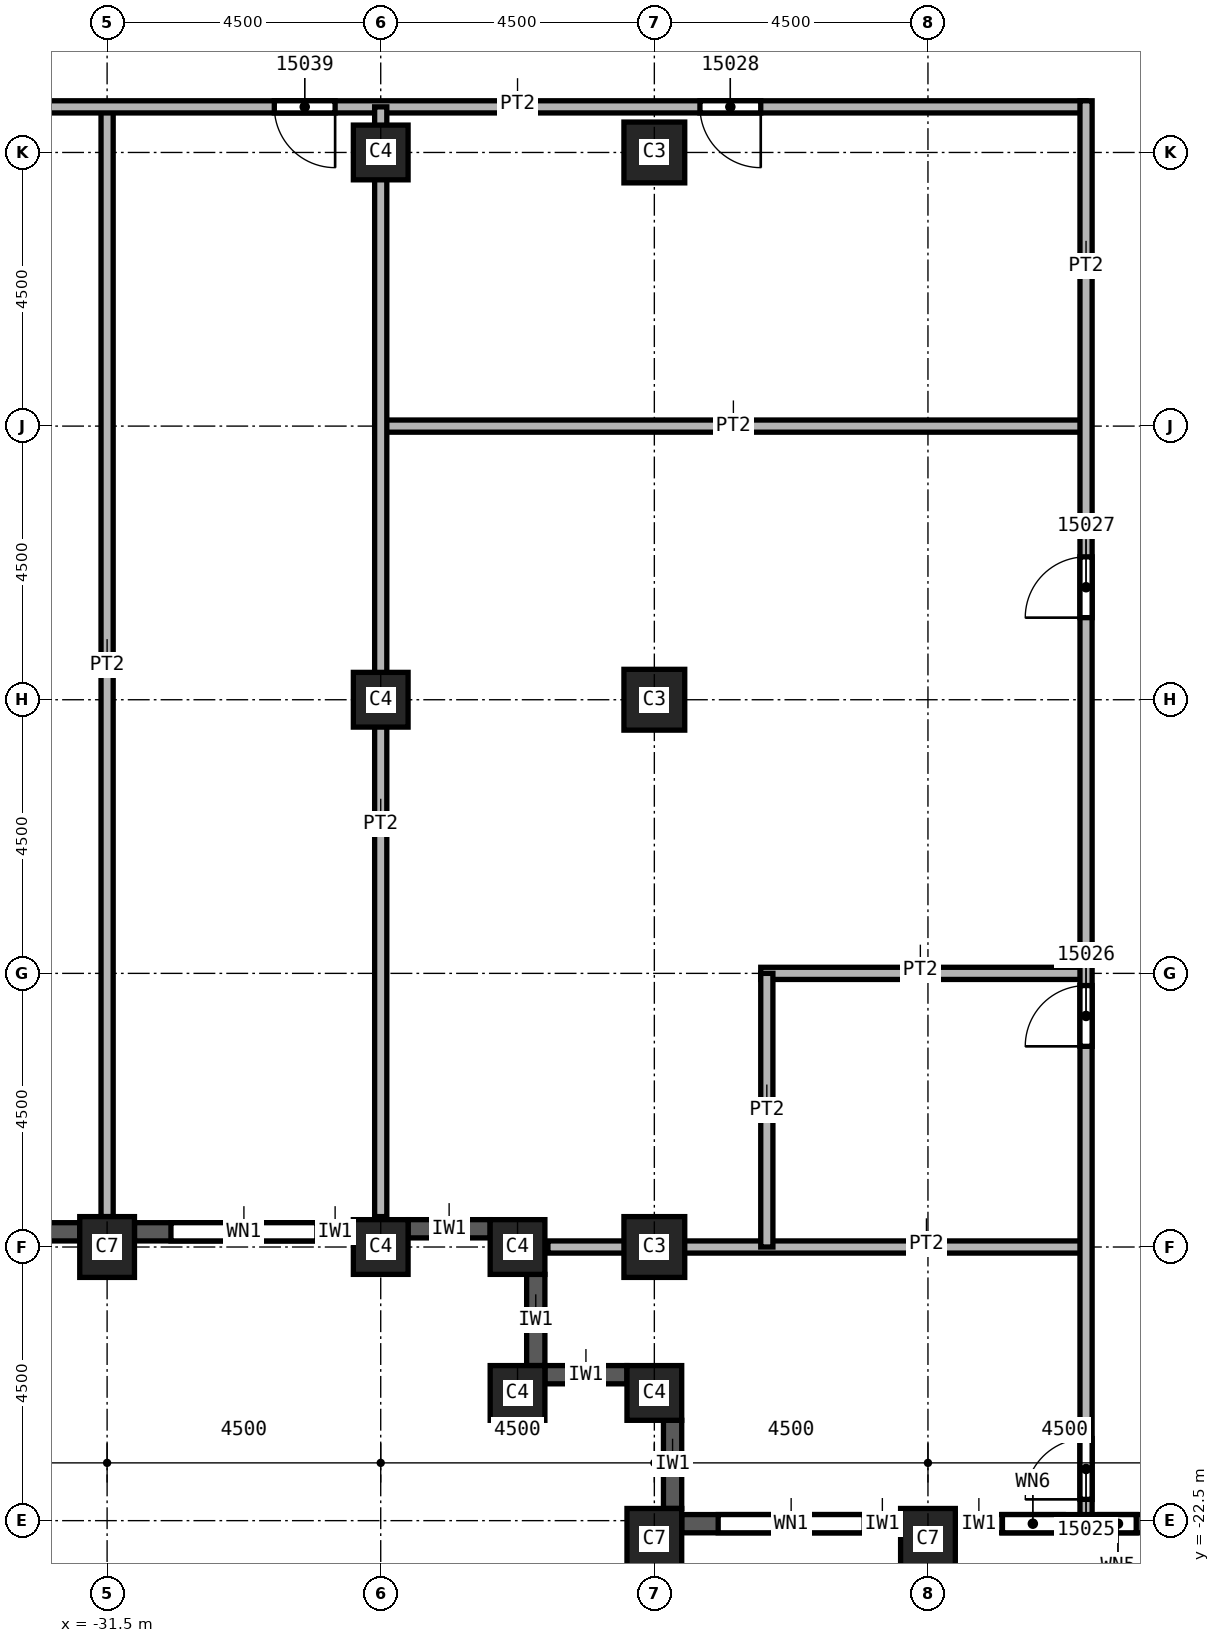
"""IFC4 building model, lengths in metres.
Left out: names, types, materials, properties, quantities, classifications, styles, units other than length and angle.
Written with IfcOpenShell. Run it as: python <this file> out.ifc"""

import sys

from ifc_helpers import new_model, si_unit, direction, frame, frame_2d, origin, origin_2d, place, context, subcontext, project, spatial, rectangle, extrude, element, fill, save


model = new_model("IFC4")
c1 = context("Model", 3, precision=1e-05, world=origin(), true_north=direction((0.0, 1.0)))
c2 = subcontext(c1, "Body", "Model", "MODEL_VIEW")
j1 = project(units=[si_unit("LENGTHUNIT", "METRE"), si_unit("PLANEANGLEUNIT", "RADIAN")], contexts=[c1])
p1 = place(None, origin())
s1 = spatial("IfcSite", under=j1, at=p1, CompositionType="ELEMENT")
p2 = place(p1, origin())
s2 = spatial("IfcBuilding", under=s1, at=p2, CompositionType="ELEMENT")
p3 = place(p2, frame((0.0, 0.0, 228.0)))
s3 = spatial("IfcBuildingStorey", under=s2, at=p3, CompositionType="ELEMENT", Elevation=228.0)
p4 = place(p3, frame((-31.5, -18.0, 0.0), z_axis=(0.0, 0.0, 1.0), x_axis=(1.0, 0.0, 0.0)))
e1 = element("IfcColumn", 1, at=p4, inside=s3, PredefinedType="COLUMN", context=c2, shape_type="SweptSolid", body=[
    extrude(rectangle(XDim=0.9, YDim=1.0, at=origin_2d()), origin(), (0.0, 0.0, 1.0), 3.72),
])
for number, where, z_axis, x_axis in (
    (2, (-22.5, 0.0, 0.0), (0.0, 0.0, 1.0), (1.0, 0.0, 0.0)),
    (3, (-22.5, -9.0, 0.0), (0.0, 0.0, 1.0), (1.0, 0.0, 0.0)),
    (4, (-22.5, -18.0, 0.0), (0.0, 0.0, 1.0), (1.0, 0.0, 0.0)),
):
    element("IfcColumn", number, at=place(p3, frame(where, z_axis=z_axis, x_axis=x_axis)), inside=s3, PredefinedType="COLUMN", context=c2, shape_type="SweptSolid", body=[
        extrude(rectangle(XDim=1.0, YDim=1.0, at=origin_2d()), origin(), (0.0, 0.0, 1.0), 3.72),
    ])
for number, where, z_axis, x_axis in (
    (5, (-18.0, -22.8, 0.0), (0.0, 0.0, 1.0), (1.0, 0.0, 0.0)),
    (6, (-22.5, -22.8, 0.0), (0.0, 0.0, 1.0), (1.0, 0.0, 0.0)),
):
    element("IfcColumn", number, at=place(p3, frame(where, z_axis=z_axis, x_axis=x_axis)), inside=s3, PredefinedType="COLUMN", context=c2, shape_type="SweptSolid", body=[
        extrude(rectangle(XDim=0.9, YDim=1.0, at=origin_2d()), origin(), (0.0, 0.0, 1.0), 3.72),
    ])
for number, where, z_axis, x_axis in (
    (7, (-27.0, 0.0, 0.0), (0.0, 0.0, 1.0), (1.0, 0.0, 0.0)),
    (8, (-27.0, -9.0, 0.0), (0.0, 0.0, 1.0), (1.0, 0.0, 0.0)),
    (9, (-27.0, -18.0, 0.0), (0.0, 0.0, 1.0), (1.0, 0.0, 0.0)),
    (10, (-22.5, -20.4, 0.0), (0.0, 0.0, 1.0), (1.0, 0.0, 0.0)),
    (11, (-24.75, -20.4, 0.0), (0.0, 0.0, 1.0), (1.0, 0.0, 0.0)),
    (12, (-24.75, -18.0, 0.0), (0.0, 0.0, 1.0), (1.0, 0.0, 0.0)),
):
    element("IfcColumn", number, at=place(p3, frame(where, z_axis=z_axis, x_axis=x_axis)), inside=s3, PredefinedType="COLUMN", context=c2, shape_type="SweptSolid", body=[
        extrude(rectangle(XDim=0.9, YDim=0.9, at=origin_2d()), origin(), (0.0, 0.0, 1.0), 3.72),
    ])
p5 = place(p3, frame((-35.55, -17.75, 0.0), z_axis=(0.0, 0.0, 1.0), x_axis=(1.0, 0.0, 0.0)))
e13 = element("IfcWall", 13, at=p5, inside=s3, PredefinedType="SOLIDWALL", context=c2, shape_type="SweptSolid", body=[
    extrude(rectangle(XDim=3.6, YDim=0.3, at=frame_2d((1.8, 0.0))), origin(), (0.0, 0.0, 1.0), 3.12),
])
p6 = place(p5, frame((0.6, 0.0, 0.8)))
e14 = element("IfcOpeningElement", 14, at=p6, cuts=e13, PredefinedType="OPENING", context=c2, shape_type="SweptSolid", body=[
    extrude(rectangle(XDim=2.4, YDim=1.95, at=frame_2d((1.2, 0.975))), frame((0.0, 0.15, 0.0), z_axis=(0.0, -1.0, 0.0), x_axis=(1.0, 0.0, 0.0)), (0.0, 0.0, 1.0), 0.3),
])
p7 = place(p3, frame((-31.05, -17.75, 0.0), z_axis=(0.0, 0.0, 1.0), x_axis=(1.0, 0.0, 0.0)))
e15 = element("IfcWall", 15, at=p7, inside=s3, PredefinedType="SOLIDWALL", context=c2, shape_type="SweptSolid", body=[
    extrude(rectangle(XDim=3.6, YDim=0.3, at=frame_2d((1.8, 0.0))), origin(), (0.0, 0.0, 1.0), 3.12),
])
p8 = place(p7, frame((0.6, 0.0, 0.8)))
e16 = element("IfcOpeningElement", 16, at=p8, cuts=e15, PredefinedType="OPENING", context=c2, shape_type="SweptSolid", body=[
    extrude(rectangle(XDim=2.4, YDim=1.95, at=frame_2d((1.2, 0.975))), frame((0.0, 0.15, 0.0), z_axis=(0.0, -1.0, 0.0), x_axis=(1.0, 0.0, 0.0)), (0.0, 0.0, 1.0), 0.3),
])
p9 = place(p3, frame((-26.55, -17.7, 0.0), z_axis=(0.0, 0.0, 1.0), x_axis=(1.0, 0.0, 0.0)))
e17 = element("IfcWall", 17, at=p9, inside=s3, PredefinedType="SOLIDWALL", context=c2, shape_type="SweptSolid", body=[
    extrude(rectangle(XDim=1.35, YDim=0.3, at=frame_2d((0.675, 0.0))), origin(), (0.0, 0.0, 1.0), 3.12),
])
p10 = place(p3, frame((-24.45, -18.45, 0.0), z_axis=(0.0, 0.0, 1.0), x_axis=(0.0, -1.0, 0.0)))
e18 = element("IfcWall", 18, at=p10, inside=s3, PredefinedType="SOLIDWALL", context=c2, shape_type="SweptSolid", body=[
    extrude(rectangle(XDim=1.5, YDim=0.3, at=frame_2d((0.75, 0.0))), origin(), (0.0, 0.0, 1.0), 3.12),
])
p11 = place(p3, frame((-24.3, -20.1, 0.0), z_axis=(0.0, 0.0, 1.0), x_axis=(1.0, 0.0, 0.0)))
e19 = element("IfcWall", 19, at=p11, inside=s3, PredefinedType="SOLIDWALL", context=c2, shape_type="SweptSolid", body=[
    extrude(rectangle(XDim=1.35, YDim=0.3, at=frame_2d((0.675, 0.0))), origin(), (0.0, 0.0, 1.0), 3.12),
])
p12 = place(p3, frame((-22.2, -20.85, 0.0), z_axis=(0.0, 0.0, 1.0), x_axis=(0.0, -1.0, 0.0)))
e20 = element("IfcWall", 20, at=p12, inside=s3, PredefinedType="SOLIDWALL", context=c2, shape_type="SweptSolid", body=[
    extrude(rectangle(XDim=1.45, YDim=0.3, at=frame_2d((0.725, 0.0))), origin(), (0.0, 0.0, 1.0), 3.12),
])
p13 = place(p3, frame((-22.05, -22.55, 0.0), z_axis=(0.0, 0.0, 1.0), x_axis=(1.0, 0.0, 0.0)))
e21 = element("IfcWall", 21, at=p13, inside=s3, PredefinedType="SOLIDWALL", context=c2, shape_type="SweptSolid", body=[
    extrude(rectangle(XDim=3.6, YDim=0.3, at=frame_2d((1.8, 0.0))), origin(), (0.0, 0.0, 1.0), 3.12),
])
p14 = place(p13, frame((0.6, 0.0, 0.8)))
e22 = element("IfcOpeningElement", 22, at=p14, cuts=e21, PredefinedType="OPENING", context=c2, shape_type="SweptSolid", body=[
    extrude(rectangle(XDim=2.4, YDim=1.95, at=frame_2d((1.2, 0.975))), frame((0.0, 0.15, 0.0), z_axis=(0.0, -1.0, 0.0), x_axis=(1.0, 0.0, 0.0)), (0.0, 0.0, 1.0), 0.3),
])
p15 = place(p3, frame((-17.55, -22.55, 0.0), z_axis=(0.0, 0.0, 1.0), x_axis=(1.0, 0.0, 0.0)))
e23 = element("IfcWall", 23, at=p15, inside=s3, PredefinedType="SOLIDWALL", context=c2, shape_type="SweptSolid", body=[
    extrude(rectangle(XDim=3.6, YDim=0.3, at=frame_2d((1.8, 0.0))), origin(), (0.0, 0.0, 1.0), 3.12),
])
p16 = place(p15, frame((0.775, 0.0, 0.8)))
e24 = element("IfcOpeningElement", 24, at=p16, cuts=e23, PredefinedType="OPENING", context=c2, shape_type="SweptSolid", body=[
    extrude(rectangle(XDim=1.0, YDim=1.95, at=frame_2d((0.5, 0.975))), frame((0.0, 0.15, 0.0), z_axis=(0.0, -1.0, 0.0), x_axis=(1.0, 0.0, 0.0)), (0.0, 0.0, 1.0), 0.3),
])
p17 = place(p15, frame((2.375, 0.0, 0.8)))
e25 = element("IfcOpeningElement", 25, at=p17, cuts=e23, PredefinedType="OPENING", context=c2, shape_type="SweptSolid", body=[
    extrude(rectangle(XDim=0.6, YDim=1.95, at=frame_2d((0.3, 0.975))), frame((0.0, 0.15, 0.0), z_axis=(0.0, -1.0, 0.0), x_axis=(1.0, 0.0, 0.0)), (0.0, 0.0, 1.0), 0.3),
])
p18 = place(p3, frame((-31.5, 0.75, 0.0), z_axis=(0.0, 0.0, 1.0), x_axis=(0.0, -1.0, 0.0)))
e26 = element("IfcWall", 26, at=p18, inside=s3, PredefinedType="PARTITIONING", context=c2, shape_type="SweptSolid", body=[
    extrude(rectangle(XDim=18.25, YDim=0.2, at=frame_2d((9.125, 0.0))), origin(), (0.0, 0.0, 1.0), 3.72),
])
p19 = place(p3, frame((-15.4, 0.75, 0.0), z_axis=(0.0, 0.0, 1.0), x_axis=(-1.0, 0.0, 0.0)))
e27 = element("IfcWall", 27, at=p19, inside=s3, PredefinedType="PARTITIONING", context=c2, shape_type="SweptSolid", body=[
    extrude(rectangle(XDim=18.45, YDim=0.2, at=frame_2d((9.225, 0.0))), origin(), (0.0, 0.0, 1.0), 3.72),
])
p20 = place(p19, frame((5.35, 0.0, 0.0)))
e28 = element("IfcOpeningElement", 28, at=p20, cuts=e27, PredefinedType="OPENING", context=c2, shape_type="SweptSolid", body=[
    extrude(rectangle(XDim=1.0, YDim=2.1, at=frame_2d((0.5, 1.05))), frame((0.0, 0.1, 0.0), z_axis=(0.0, -1.0, 0.0), x_axis=(1.0, 0.0, 0.0)), (0.0, 0.0, 1.0), 0.2),
])
p21 = place(p19, frame((12.35, 0.0, 0.0)))
e29 = element("IfcOpeningElement", 29, at=p21, cuts=e27, PredefinedType="OPENING", context=c2, shape_type="SweptSolid", body=[
    extrude(rectangle(XDim=1.0, YDim=2.1, at=frame_2d((0.5, 1.05))), frame((0.0, 0.1, 0.0), z_axis=(0.0, -1.0, 0.0), x_axis=(1.0, 0.0, 0.0)), (0.0, 0.0, 1.0), 0.2),
])
p22 = place(p3, frame((-27.1, -4.5, 0.0), z_axis=(0.0, 0.0, 1.0), x_axis=(1.0, 0.0, 0.0)))
e30 = element("IfcWall", 30, at=p22, inside=s3, PredefinedType="PARTITIONING", context=c2, shape_type="SweptSolid", body=[
    extrude(rectangle(XDim=11.7, YDim=0.2, at=frame_2d((5.85, 0.0))), origin(), (0.0, 0.0, 1.0), 3.72),
])
p23 = place(p3, frame((-27.0, -17.5, 0.0), z_axis=(0.0, 0.0, 1.0), x_axis=(0.0, 1.0, 0.0)))
e31 = element("IfcWall", 31, at=p23, inside=s3, PredefinedType="PARTITIONING", context=c2, shape_type="SweptSolid", body=[
    extrude(rectangle(XDim=18.25, YDim=0.2, at=frame_2d((9.125, 0.0))), origin(), (0.0, 0.0, 1.0), 3.72),
])
p24 = place(p3, frame((-24.25, -18.0, 0.0), z_axis=(0.0, 0.0, 1.0), x_axis=(1.0, 0.0, 0.0)))
e32 = element("IfcWall", 32, at=p24, inside=s3, PredefinedType="PARTITIONING", context=c2, shape_type="SweptSolid", body=[
    extrude(rectangle(XDim=8.85, YDim=0.2, at=frame_2d((4.425, 0.0))), origin(), (0.0, 0.0, 1.0), 3.72),
])
p25 = place(p3, frame((-20.75, -13.5, 0.0), z_axis=(0.0, 0.0, 1.0), x_axis=(1.0, 0.0, 0.0)))
e33 = element("IfcWall", 33, at=p25, inside=s3, PredefinedType="PARTITIONING", context=c2, shape_type="SweptSolid", body=[
    extrude(rectangle(XDim=5.35, YDim=0.2, at=frame_2d((2.675, 0.0))), origin(), (0.0, 0.0, 1.0), 3.72),
])
p26 = place(p3, frame((-20.65, -18.0, 0.0), z_axis=(0.0, 0.0, 1.0), x_axis=(0.0, 1.0, 0.0)))
e34 = element("IfcWall", 34, at=p26, inside=s3, PredefinedType="PARTITIONING", context=c2, shape_type="SweptSolid", body=[
    extrude(rectangle(XDim=4.5, YDim=0.2, at=frame_2d((2.25, 0.0))), origin(), (0.0, 0.0, 1.0), 3.72),
])
p27 = place(p3, frame((-15.4, -22.4, 0.0), z_axis=(0.0, 0.0, 1.0), x_axis=(0.0, 1.0, 0.0)))
e35 = element("IfcWall", 35, at=p27, inside=s3, PredefinedType="PARTITIONING", context=c2, shape_type="SweptSolid", body=[
    extrude(rectangle(XDim=23.25, YDim=0.2, at=frame_2d((11.625, 0.0))), origin(), (0.0, 0.0, 1.0), 3.72),
])
p28 = place(p27, frame((0.25, 0.0, 0.0)))
e36 = element("IfcOpeningElement", 36, at=p28, cuts=e35, PredefinedType="OPENING", context=c2, shape_type="SweptSolid", body=[
    extrude(rectangle(XDim=1.0, YDim=2.1, at=frame_2d((0.5, 1.05))), frame((0.0, 0.1, 0.0), z_axis=(0.0, -1.0, 0.0), x_axis=(1.0, 0.0, 0.0)), (0.0, 0.0, 1.0), 0.2),
])
p29 = place(p27, frame((7.7, 0.0, 0.0)))
e37 = element("IfcOpeningElement", 37, at=p29, cuts=e35, PredefinedType="OPENING", context=c2, shape_type="SweptSolid", body=[
    extrude(rectangle(XDim=1.0, YDim=2.1, at=frame_2d((0.5, 1.05))), frame((0.0, 0.1, 0.0), z_axis=(0.0, -1.0, 0.0), x_axis=(1.0, 0.0, 0.0)), (0.0, 0.0, 1.0), 0.2),
])
p30 = place(p27, frame((14.75, 0.0, 0.0)))
e38 = element("IfcOpeningElement", 38, at=p30, cuts=e35, PredefinedType="OPENING", context=c2, shape_type="SweptSolid", body=[
    extrude(rectangle(XDim=1.0, YDim=2.1, at=frame_2d((0.5, 1.05))), frame((0.0, 0.1, 0.0), z_axis=(0.0, -1.0, 0.0), x_axis=(1.0, 0.0, 0.0)), (0.0, 0.0, 1.0), 0.2),
])
p31 = place(p8, origin())
e39 = element("IfcWindow", 39, at=p31, inside=s3, PartitioningType="SINGLE_PANEL", PredefinedType="WINDOW", context=c2, shape_type="SweptSolid", body=[
    extrude(rectangle(XDim=2.4, YDim=1.95, at=frame_2d((1.2, 0.975))), frame((0.0, 0.03, 0.0), z_axis=(0.0, -1.0, 0.0), x_axis=(1.0, 0.0, 0.0)), (0.0, 0.0, 1.0), 0.06),
])
fill(e16, e39)
p32 = place(p14, origin())
e40 = element("IfcWindow", 40, at=p32, inside=s3, PartitioningType="SINGLE_PANEL", PredefinedType="WINDOW", context=c2, shape_type="SweptSolid", body=[
    extrude(rectangle(XDim=2.4, YDim=1.95, at=frame_2d((1.2, 0.975))), frame((0.0, 0.03, 0.0), z_axis=(0.0, -1.0, 0.0), x_axis=(1.0, 0.0, 0.0)), (0.0, 0.0, 1.0), 0.06),
])
fill(e22, e40)
p33 = place(p28, origin())
e41 = element("IfcDoor", 41, at=p33, inside=s3, OperationType="SINGLE_SWING_RIGHT", PredefinedType="DOOR", context=c2, shape_type="SweptSolid", body=[
    extrude(rectangle(XDim=1.0, YDim=2.1, at=frame_2d((0.5, 1.05))), frame((0.0, 0.025, 0.0), z_axis=(0.0, -1.0, 0.0), x_axis=(1.0, 0.0, 0.0)), (0.0, 0.0, 1.0), 0.05),
])
fill(e36, e41)
p34 = place(p29, origin())
e42 = element("IfcDoor", 42, at=p34, inside=s3, OperationType="SINGLE_SWING_LEFT", PredefinedType="DOOR", context=c2, shape_type="SweptSolid", body=[
    extrude(rectangle(XDim=1.0, YDim=2.1, at=frame_2d((0.5, 1.05))), frame((0.0, 0.025, 0.0), z_axis=(0.0, -1.0, 0.0), x_axis=(1.0, 0.0, 0.0)), (0.0, 0.0, 1.0), 0.05),
])
fill(e37, e42)
p35 = place(p30, origin())
e43 = element("IfcDoor", 43, at=p35, inside=s3, OperationType="SINGLE_SWING_RIGHT", PredefinedType="DOOR", context=c2, shape_type="SweptSolid", body=[
    extrude(rectangle(XDim=1.0, YDim=2.1, at=frame_2d((0.5, 1.05))), frame((0.0, 0.025, 0.0), z_axis=(0.0, -1.0, 0.0), x_axis=(1.0, 0.0, 0.0)), (0.0, 0.0, 1.0), 0.05),
])
fill(e38, e43)
p36 = place(p20, origin())
e44 = element("IfcDoor", 44, at=p36, inside=s3, OperationType="SINGLE_SWING_LEFT", PredefinedType="DOOR", context=c2, shape_type="SweptSolid", body=[
    extrude(rectangle(XDim=1.0, YDim=2.1, at=frame_2d((0.5, 1.05))), frame((0.0, 0.025, 0.0), z_axis=(0.0, -1.0, 0.0), x_axis=(1.0, 0.0, 0.0)), (0.0, 0.0, 1.0), 0.05),
])
fill(e28, e44)
p37 = place(p21, origin())
e45 = element("IfcDoor", 45, at=p37, inside=s3, OperationType="SINGLE_SWING_RIGHT", PredefinedType="DOOR", context=c2, shape_type="SweptSolid", body=[
    extrude(rectangle(XDim=1.0, YDim=2.1, at=frame_2d((0.5, 1.05))), frame((0.0, 0.025, 0.0), z_axis=(0.0, -1.0, 0.0), x_axis=(1.0, 0.0, 0.0)), (0.0, 0.0, 1.0), 0.05),
])
fill(e29, e45)
p38 = place(p16, origin())
e46 = element("IfcWindow", 46, at=p38, inside=s3, PartitioningType="SINGLE_PANEL", PredefinedType="WINDOW", context=c2, shape_type="SweptSolid", body=[
    extrude(rectangle(XDim=1.0, YDim=1.95, at=frame_2d((0.5, 0.975))), frame((0.0, 0.03, 0.0), z_axis=(0.0, -1.0, 0.0), x_axis=(1.0, 0.0, 0.0)), (0.0, 0.0, 1.0), 0.06),
])
fill(e24, e46)
p39 = place(p17, origin())
e47 = element("IfcWindow", 47, at=p39, inside=s3, PartitioningType="SINGLE_PANEL", PredefinedType="WINDOW", context=c2, shape_type="SweptSolid", body=[
    extrude(rectangle(XDim=0.6, YDim=1.95, at=frame_2d((0.3, 0.975))), frame((0.0, 0.03, 0.0), z_axis=(0.0, -1.0, 0.0), x_axis=(1.0, 0.0, 0.0)), (0.0, 0.0, 1.0), 0.06),
])
fill(e25, e47)
save(model, sys.argv[1])
